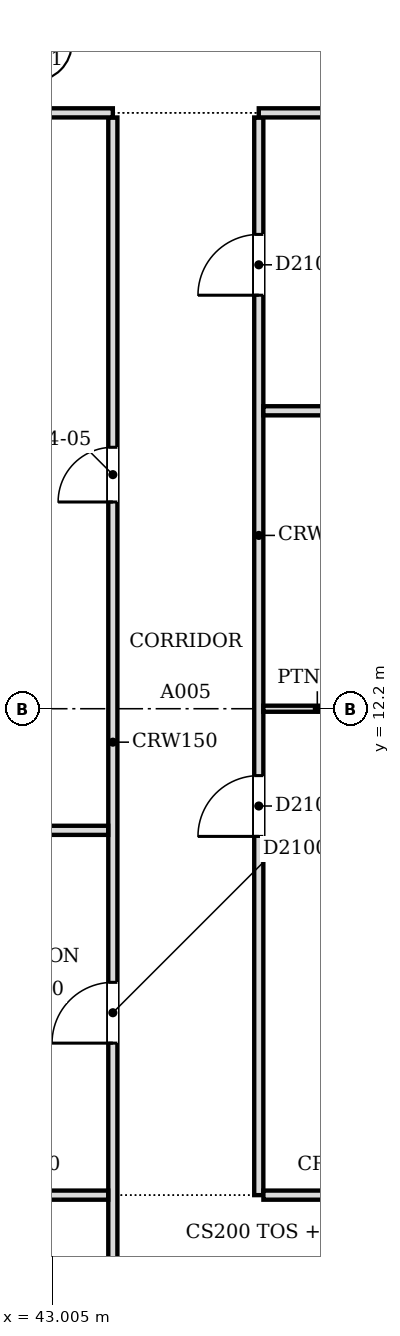
"""IFC4 building model, lengths in metres.
Left out: names, types, materials, properties, quantities, classifications, styles, units other than length and angle.
Written with IfcOpenShell. Run it as: python <this file> out.ifc"""

import sys

from ifc_helpers import new_model, si_unit, direction, frame, frame_2d, origin, place, context, subcontext, project, spatial, rectangle, extrude, source, transform, mapped, element, fill, save


model = new_model("IFC4")
c1 = context("Model", 3, precision=1e-05, world=origin(), true_north=direction((0.0, 1.0)))
c2 = subcontext(c1, "Body", "Model", "MODEL_VIEW")
j1 = project(units=[si_unit("LENGTHUNIT", "METRE"), si_unit("PLANEANGLEUNIT", "RADIAN")], contexts=[c1])
p1 = place(None, origin())
s1 = spatial("IfcSite", under=j1, at=p1, CompositionType="ELEMENT")
p2 = place(p1, origin())
s2 = spatial("IfcBuilding", under=s1, at=p2, CompositionType="ELEMENT")
p3 = place(p2, frame((0.0, 0.0, 52.4)))
s3 = spatial("IfcBuildingStorey", under=s2, at=p3, CompositionType="ELEMENT", Elevation=52.4)
p4 = place(p3, frame((44.0, 0.5, 0.0), z_axis=(0.0, 0.0, 1.0), x_axis=(0.0, 1.0, 0.0)))
e1 = element("IfcWall", 1, at=p4, inside=s3, PredefinedType="PARTITIONING", context=c2, shape_type="SweptSolid", body=[
    extrude(rectangle(XDim=21.424, YDim=0.15, at=frame_2d((10.712, 0.0))), origin(), (0.0, 0.0, 1.0), 3.067),
])
m1 = source(origin(), c2, "Body", "SweptSolid", [
    extrude(rectangle(XDim=1.0, YDim=2.1, at=frame_2d((0.5, 1.05))), frame((0.0, 0.085, 0.0), z_axis=(0.0, -1.0, 0.0), x_axis=(1.0, 0.0, 0.0)), (0.0, 0.0, 1.0), 0.17),
])
p5 = place(p4, frame((6.2, 0.0, 0.0)))
e2 = element("IfcOpeningElement", 2, at=p5, cuts=e1, PredefinedType="OPENING", context=c2, shape_type="MappedRepresentation", body=[
    mapped(m1, transform((0.0, 0.0, 0.0), scale=1.0)),
])
m2 = source(origin(), c2, "Body", "SweptSolid", [
    extrude(rectangle(XDim=0.9, YDim=2.1, at=frame_2d((0.45, 1.05))), frame((0.0, 0.085, 0.0), z_axis=(0.0, -1.0, 0.0), x_axis=(1.0, 0.0, 0.0)), (0.0, 0.0, 1.0), 0.17),
])
p6 = place(p4, frame((15.1, 0.0, 0.0)))
e3 = element("IfcOpeningElement", 3, at=p6, cuts=e1, PredefinedType="OPENING", context=c2, shape_type="MappedRepresentation", body=[
    mapped(m2, transform((0.0, 0.0, 0.0), scale=1.0)),
])
p7 = place(p3, frame((40.951, 4.2, 0.0), z_axis=(0.0, 0.0, 1.0), x_axis=(1.0, 0.0, 0.0)))
e4 = element("IfcWall", 4, at=p7, inside=s3, PredefinedType="PARTITIONING", context=c2, shape_type="SweptSolid", body=[
    extrude(rectangle(XDim=2.973, YDim=0.15, at=frame_2d((1.487, 0.0))), origin(), (0.0, 0.0, 1.0), 3.067),
])
p8 = place(p3, frame((46.4, 21.924, 0.0), z_axis=(0.0, 0.0, 1.0), x_axis=(0.0, -1.0, 0.0)))
e5 = element("IfcWall", 5, at=p8, inside=s3, PredefinedType="PARTITIONING", context=c2, shape_type="SweptSolid", body=[
    extrude(rectangle(XDim=17.724, YDim=0.15, at=frame_2d((8.862, 0.0))), origin(), (0.0, 0.0, 1.0), 3.067),
])
p9 = place(p8, frame((1.923, 0.0, 0.0)))
e6 = element("IfcOpeningElement", 6, at=p9, cuts=e5, PredefinedType="OPENING", context=c2, shape_type="MappedRepresentation", body=[
    mapped(m1, transform((0.0, 0.0, 0.0), scale=1.0)),
])
p10 = place(p8, frame((10.824, 0.0, 0.0)))
e7 = element("IfcOpeningElement", 7, at=p10, cuts=e5, PredefinedType="OPENING", context=c2, shape_type="MappedRepresentation", body=[
    mapped(m1, transform((0.0, 0.0, 0.0), scale=1.0)),
])
p11 = place(p3, frame((46.476, 4.2, 0.0), z_axis=(0.0, 0.0, 1.0), x_axis=(1.0, 0.0, 0.0)))
e8 = element("IfcWall", 8, at=p11, inside=s3, PredefinedType="PARTITIONING", context=c2, shape_type="SweptSolid", body=[
    extrude(rectangle(XDim=2.524, YDim=0.15, at=frame_2d((1.262, 0.0))), origin(), (0.0, 0.0, 1.0), 3.067),
])
p12 = place(p3, frame((27.5, 10.2, 0.0), z_axis=(0.0, 0.0, 1.0), x_axis=(1.0, 0.0, 0.0)))
e9 = element("IfcWall", 9, at=p12, inside=s3, PredefinedType="PARTITIONING", context=c2, shape_type="SweptSolid", body=[
    extrude(rectangle(XDim=16.424, YDim=0.15, at=frame_2d((8.212, 0.0))), origin(), (0.0, 0.0, 1.0), 3.067),
])
p13 = place(p3, frame((48.25, 12.2, 0.0), z_axis=(0.0, 0.0, 1.0), x_axis=(-1.0, 0.0, 0.0)))
e10 = element("IfcWall", 10, at=p13, inside=s3, PredefinedType="PARTITIONING", context=c2, shape_type="SweptSolid", body=[
    extrude(rectangle(XDim=1.775, YDim=0.1, at=frame_2d((0.887, 0.0))), origin(), (0.0, 0.0, 1.0), 3.067),
])
p14 = place(p3, frame((46.476, 17.1, 0.0), z_axis=(0.0, 0.0, 1.0), x_axis=(1.0, 0.0, 0.0)))
e11 = element("IfcWall", 11, at=p14, inside=s3, PredefinedType="PARTITIONING", context=c2, shape_type="SweptSolid", body=[
    extrude(rectangle(XDim=8.724, YDim=0.15, at=frame_2d((4.362, 0.0))), origin(), (0.0, 0.0, 1.0), 3.067),
])
p15 = place(p3, frame((30.5, 22.0, 0.0), z_axis=(0.0, 0.0, 1.0), x_axis=(1.0, 0.0, 0.0)))
e12 = element("IfcWall", 12, at=p15, inside=s3, PredefinedType="PARTITIONING", context=c2, shape_type="SweptSolid", body=[
    extrude(rectangle(XDim=13.5, YDim=0.15, at=frame_2d((6.75, 0.0))), origin(), (0.0, 0.0, 1.0), 3.067),
])
p16 = place(p3, frame((46.4, 22.0, 0.0), z_axis=(0.0, 0.0, 1.0), x_axis=(1.0, 0.0, 0.0)))
e13 = element("IfcWall", 13, at=p16, inside=s3, PredefinedType="PARTITIONING", context=c2, shape_type="SweptSolid", body=[
    extrude(rectangle(XDim=10.824, YDim=0.15, at=frame_2d((5.412, 0.0))), origin(), (0.0, 0.0, 1.0), 3.067),
])
m3 = source(origin(), c2, "Body", "SweptSolid", [
    extrude(rectangle(XDim=1.0, YDim=2.1, at=frame_2d((0.5, 1.05))), frame((0.0, 0.025, 0.0), z_axis=(0.0, -1.0, 0.0), x_axis=(1.0, 0.0, 0.0)), (0.0, 0.0, 1.0), 0.05),
])
p17 = place(p9, origin())
e14 = element("IfcDoor", 14, at=p17, inside=s3, OperationType="SINGLE_SWING_RIGHT", PredefinedType="DOOR", context=c2, shape_type="MappedRepresentation", body=[
    mapped(m3, transform((0.0, 0.0, 0.0), scale=1.0)),
])
fill(e6, e14)
p18 = place(p5, origin())
e15 = element("IfcDoor", 15, at=p18, inside=s3, OperationType="SINGLE_SWING_LEFT", PredefinedType="DOOR", context=c2, shape_type="MappedRepresentation", body=[
    mapped(m3, transform((0.0, 0.0, 0.0), scale=1.0)),
])
fill(e2, e15)
m4 = source(origin(), c2, "Body", "SweptSolid", [
    extrude(rectangle(XDim=0.9, YDim=2.1, at=frame_2d((0.45, 1.05))), frame((0.0, 0.025, 0.0), z_axis=(0.0, -1.0, 0.0), x_axis=(1.0, 0.0, 0.0)), (0.0, 0.0, 1.0), 0.05),
])
p19 = place(p6, origin())
e16 = element("IfcDoor", 16, at=p19, inside=s3, OperationType="SINGLE_SWING_LEFT", PredefinedType="DOOR", context=c2, shape_type="MappedRepresentation", body=[
    mapped(m4, transform((0.0, 0.0, 0.0), scale=1.0)),
])
fill(e3, e16)
p20 = place(p10, origin())
e17 = element("IfcDoor", 17, at=p20, inside=s3, OperationType="SINGLE_SWING_RIGHT", PredefinedType="DOOR", context=c2, shape_type="MappedRepresentation", body=[
    mapped(m3, transform((0.0, 0.0, 0.0), scale=1.0)),
])
fill(e7, e17)
save(model, sys.argv[1])
